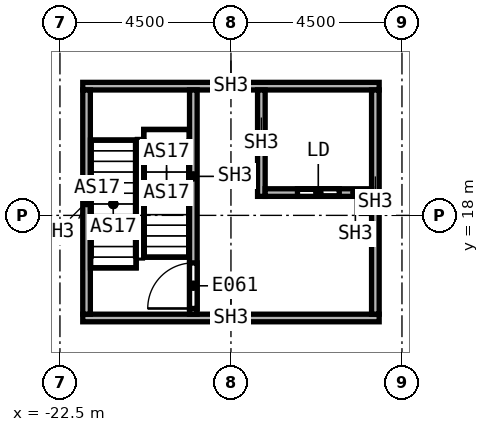
"""IFC4 building model, lengths in metres.
Left out: names, types, materials, properties, quantities, classifications, styles, units other than length and angle.
Written with IfcOpenShell. Run it as: python <this file> out.ifc"""

import sys

from ifc_helpers import new_model, si_unit, direction, frame, frame_2d, origin, place, context, subcontext, project, spatial, rectangle, extrude, element, fill, save


model = new_model("IFC4")
c1 = context("Model", 3, precision=1e-05, world=origin(), true_north=direction((0.0, 1.0)))
c2 = subcontext(c1, "Body", "Model", "MODEL_VIEW")
j1 = project(units=[si_unit("LENGTHUNIT", "METRE"), si_unit("PLANEANGLEUNIT", "RADIAN")], contexts=[c1])
p1 = place(None, origin())
s1 = spatial("IfcSite", under=j1, at=p1, CompositionType="ELEMENT")
p2 = place(p1, origin())
s2 = spatial("IfcBuilding", under=s1, at=p2, CompositionType="ELEMENT")
p3 = place(p2, frame((0.0, 0.0, 44.0)))
s3 = spatial("IfcBuildingStorey", under=s2, at=p3, CompositionType="ELEMENT", Elevation=44.0)
for number, where, z_axis, x_axis in (
    (1, (-21.9, 15.3, 0.0), (0.0, 0.0, 1.0), (1.0, 0.0, 0.0)),
    (2, (-21.9, 21.4, 0.0), (0.0, 0.0, 1.0), (1.0, 0.0, 0.0)),
):
    element("IfcWall", number, at=place(p3, frame(where, z_axis=z_axis, x_axis=x_axis)), inside=s3, PredefinedType="SOLIDWALL", context=c2, shape_type="SweptSolid", body=[
        extrude(rectangle(XDim=7.8, YDim=0.2, at=frame_2d((3.9, 0.0))), origin(), (0.0, 0.0, 1.0), 7.7),
    ])
for number, where, z_axis, x_axis in (
    (3, (-21.8, 15.4, 0.0), (0.0, 0.0, 1.0), (0.0, 1.0, 0.0)),
    (4, (-14.2, 15.4, 0.0), (0.0, 0.0, 1.0), (0.0, 1.0, 0.0)),
):
    element("IfcWall", number, at=place(p3, frame(where, z_axis=z_axis, x_axis=x_axis)), inside=s3, PredefinedType="SOLIDWALL", context=c2, shape_type="SweptSolid", body=[
        extrude(rectangle(XDim=5.9, YDim=0.2, at=frame_2d((2.95, 0.0))), origin(), (0.0, 0.0, 1.0), 7.7),
    ])
p4 = place(p3, frame((-18.99, 15.4, 0.0), z_axis=(0.0, 0.0, 1.0), x_axis=(0.0, 1.0, 0.0)))
e5 = element("IfcWall", 5, at=p4, inside=s3, PredefinedType="SOLIDWALL", context=c2, shape_type="SweptSolid", body=[
    extrude(rectangle(XDim=5.9, YDim=0.2, at=frame_2d((2.95, 0.0))), origin(), (0.0, 0.0, 1.0), 7.7),
])
p5 = place(p4, frame((0.15, 0.0, 0.0)))
e6 = element("IfcOpeningElement", 6, at=p5, cuts=e5, PredefinedType="OPENING", context=c2, shape_type="SweptSolid", body=[
    extrude(rectangle(XDim=1.2, YDim=2.1, at=frame_2d((0.6, 1.05))), frame((0.0, 0.1, 0.0), z_axis=(0.0, -1.0, 0.0), x_axis=(1.0, 0.0, 0.0)), (0.0, 0.0, 1.0), 0.2),
])
p6 = place(p3, frame((-17.2, 18.5, 0.0), z_axis=(0.0, 0.0, 1.0), x_axis=(0.0, 1.0, 0.0)))
e7 = element("IfcWall", 7, at=p6, inside=s3, PredefinedType="SOLIDWALL", context=c2, shape_type="SweptSolid", body=[
    extrude(rectangle(XDim=2.8, YDim=0.2, at=frame_2d((1.4, 0.0))), origin(), (0.0, 0.0, 1.0), 7.7),
])
p7 = place(p3, frame((-17.1, 18.6, 0.0), z_axis=(0.0, 0.0, 1.0), x_axis=(1.0, 0.0, 0.0)))
e8 = element("IfcWall", 8, at=p7, inside=s3, PredefinedType="SOLIDWALL", context=c2, shape_type="SweptSolid", body=[
    extrude(rectangle(XDim=2.8, YDim=0.2, at=frame_2d((1.4, 0.0))), origin(), (0.0, 0.0, 1.0), 7.7),
])
p8 = place(p7, frame((0.85, 0.0, 0.0)))
e9 = element("IfcOpeningElement", 9, at=p8, cuts=e8, PredefinedType="OPENING", context=c2, shape_type="SweptSolid", body=[
    extrude(rectangle(XDim=1.1, YDim=2.1, at=frame_2d((0.55, 1.05))), frame((0.0, 0.1, 0.0), z_axis=(0.0, -1.0, 0.0), x_axis=(1.0, 0.0, 0.0)), (0.0, 0.0, 1.0), 0.2),
])
p9 = place(p5, origin())
e10 = element("IfcDoor", 10, at=p9, inside=s3, OperationType="SINGLE_SWING_LEFT", PredefinedType="DOOR", context=c2, shape_type="SweptSolid", body=[
    extrude(rectangle(XDim=1.2, YDim=2.1, at=frame_2d((0.6, 1.05))), frame((0.0, 0.025, 0.0), z_axis=(0.0, -1.0, 0.0), x_axis=(1.0, 0.0, 0.0)), (0.0, 0.0, 1.0), 0.05),
])
fill(e6, e10)
p10 = place(p8, origin())
e11 = element("IfcDoor", 11, at=p10, inside=s3, OperationType="SLIDING_TO_LEFT", PredefinedType="DOOR", context=c2, shape_type="SweptSolid", body=[
    extrude(rectangle(XDim=1.1, YDim=2.1, at=frame_2d((0.55, 1.05))), frame((0.0, 0.025, 0.0), z_axis=(0.0, -1.0, 0.0), x_axis=(1.0, 0.0, 0.0)), (0.0, 0.0, 1.0), 0.05),
])
fill(e9, e11)
save(model, sys.argv[1])
